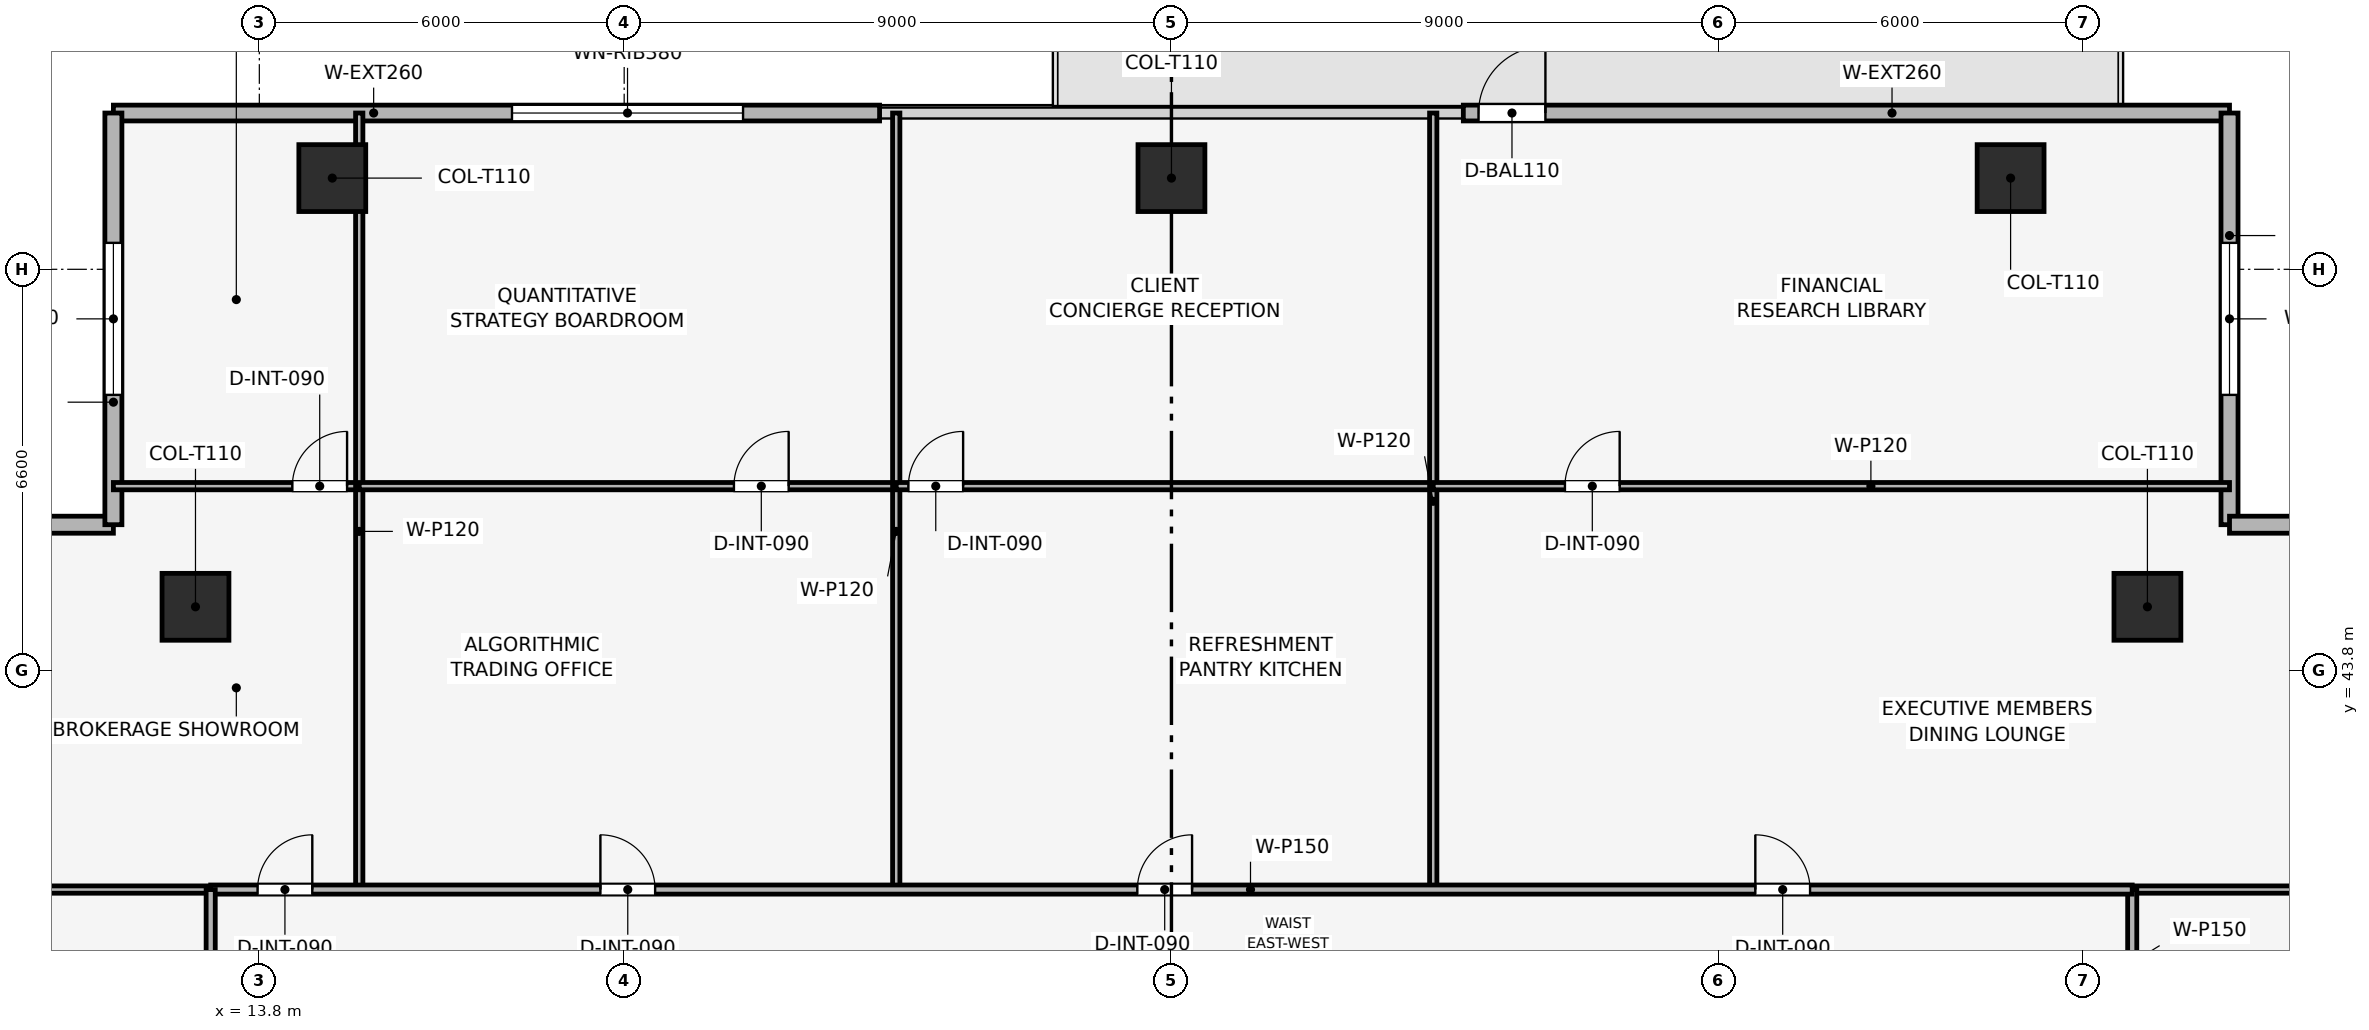
"""IFC4 building model, lengths in metres.
Left out: names, types, materials, properties, quantities, classifications, styles, units other than length and angle.
Written with IfcOpenShell. Run it as: python <this file> out.ifc"""

import sys

from ifc_helpers import new_model, si_unit, direction, frame, frame_2d, origin, origin_2d, place, context, subcontext, project, spatial, rectangle, extrude, element, fill, save


model = new_model("IFC4")
c1 = context("Model", 3, precision=1e-05, world=origin(), true_north=direction((0.0, 1.0)))
c2 = subcontext(c1, "Body", "Model", "MODEL_VIEW")
j1 = project(units=[si_unit("LENGTHUNIT", "METRE"), si_unit("PLANEANGLEUNIT", "RADIAN")], contexts=[c1])
p1 = place(None, origin())
s1 = spatial("IfcSite", under=j1, at=p1, CompositionType="ELEMENT")
p2 = place(p1, origin())
s2 = spatial("IfcBuilding", under=s1, at=p2, CompositionType="ELEMENT")
p3 = place(p2, frame((0.0, 0.0, 183.3)))
s3 = spatial("IfcBuildingStorey", under=s2, at=p3, CompositionType="ELEMENT", Elevation=183.3)
for number, where, z_axis, x_axis in (
    (1, (42.6, 51.9, 0.003), (0.0, 0.0, 1.0), (1.0, 0.0, 0.0)),
    (2, (28.8, 51.9, 0.003), (0.0, 0.0, 1.0), (1.0, 0.0, 0.0)),
    (3, (15.0, 51.9, 0.003), (0.0, 0.0, 1.0), (1.0, 0.0, 0.0)),
    (4, (44.85, 44.85, 0.003), (0.0, 0.0, 1.0), (1.0, 0.0, 0.0)),
    (5, (12.75, 44.85, 0.003), (0.0, 0.0, 1.0), (1.0, 0.0, 0.0)),
):
    element("IfcColumn", number, at=place(p3, frame(where, z_axis=z_axis, x_axis=x_axis)), inside=s3, PredefinedType="COLUMN", context=c2, shape_type="SweptSolid", body=[
        extrude(rectangle(XDim=1.1, YDim=1.1, at=origin_2d()), origin(), (0.0, 0.0, 1.0), 3.489),
    ])
p4 = place(p3, frame((11.4, 52.97, 0.0), z_axis=(0.0, 0.0, 1.0), x_axis=(1.0, 0.0, 0.0)))
e6 = element("IfcWall", 6, at=p4, inside=s3, PredefinedType="SOLIDWALL", context=c2, shape_type="SweptSolid", body=[
    extrude(rectangle(XDim=12.6, YDim=0.26, at=frame_2d((6.3, 0.0))), origin(), (0.0, 0.0, 1.0), 3.495),
])
p5 = place(p4, frame((6.555, 0.0, 0.9)))
e7 = element("IfcOpeningElement", 7, at=p5, cuts=e6, PredefinedType="OPENING", context=c2, shape_type="SweptSolid", body=[
    extrude(rectangle(XDim=3.8, YDim=1.9, at=frame_2d((1.9, 0.95))), frame((0.0, 0.14, 0.0), z_axis=(0.0, -1.0, 0.0), x_axis=(1.0, 0.0, 0.0)), (0.0, 0.0, 1.0), 0.28),
])
p6 = place(p3, frame((33.6, 52.97, 0.0), z_axis=(0.0, 0.0, 1.0), x_axis=(1.0, 0.0, 0.0)))
e8 = element("IfcWall", 8, at=p6, inside=s3, PredefinedType="SOLIDWALL", context=c2, shape_type="SweptSolid", body=[
    extrude(rectangle(XDim=12.6, YDim=0.26, at=frame_2d((6.3, 0.0))), origin(), (0.0, 0.0, 1.0), 3.495),
])
p7 = place(p6, frame((0.25, 0.0, 0.0)))
e9 = element("IfcOpeningElement", 9, at=p7, cuts=e8, PredefinedType="OPENING", context=c2, shape_type="SweptSolid", body=[
    extrude(rectangle(XDim=1.1, YDim=2.2, at=frame_2d((0.55, 1.1))), frame((0.0, 0.14, 0.0), z_axis=(0.0, -1.0, 0.0), x_axis=(1.0, 0.0, 0.0)), (0.0, 0.0, 1.0), 0.28),
])
p8 = place(p3, frame((4.63, 46.2, 0.0), z_axis=(0.0, 0.0, 1.0), x_axis=(1.0, 0.0, 0.0)))
e10 = element("IfcWall", 10, at=p8, inside=s3, PredefinedType="SOLIDWALL", context=c2, shape_type="SweptSolid", body=[
    extrude(rectangle(XDim=6.77, YDim=0.28, at=frame_2d((3.385, 0.0))), origin(), (0.0, 0.0, 1.0), 3.495),
])
p9 = place(p8, frame((2.135, 0.0, 0.9)))
e11 = element("IfcOpeningElement", 11, at=p9, cuts=e10, PredefinedType="OPENING", context=c2, shape_type="SweptSolid", body=[
    extrude(rectangle(XDim=2.5, YDim=1.9, at=frame_2d((1.25, 0.95))), frame((0.0, 0.15, 0.0), z_axis=(0.0, -1.0, 0.0), x_axis=(1.0, 0.0, 0.0)), (0.0, 0.0, 1.0), 0.3),
])
p10 = place(p3, frame((11.4, 46.2, 0.0), z_axis=(0.0, 0.0, 1.0), x_axis=(0.0, 1.0, 0.0)))
e12 = element("IfcWall", 12, at=p10, inside=s3, PredefinedType="SOLIDWALL", context=c2, shape_type="SweptSolid", body=[
    extrude(rectangle(XDim=6.77, YDim=0.28, at=frame_2d((3.385, 0.0))), origin(), (0.0, 0.0, 1.0), 3.495),
])
p11 = place(p10, frame((2.135, 0.0, 0.9)))
e13 = element("IfcOpeningElement", 13, at=p11, cuts=e12, PredefinedType="OPENING", context=c2, shape_type="SweptSolid", body=[
    extrude(rectangle(XDim=2.5, YDim=1.9, at=frame_2d((1.25, 0.95))), frame((0.0, 0.15, 0.0), z_axis=(0.0, -1.0, 0.0), x_axis=(1.0, 0.0, 0.0)), (0.0, 0.0, 1.0), 0.3),
])
p12 = place(p3, frame((46.2, 52.97, 0.0), z_axis=(0.0, 0.0, 1.0), x_axis=(0.0, -1.0, 0.0)))
e14 = element("IfcWall", 14, at=p12, inside=s3, PredefinedType="SOLIDWALL", context=c2, shape_type="SweptSolid", body=[
    extrude(rectangle(XDim=6.77, YDim=0.28, at=frame_2d((3.385, 0.0))), origin(), (0.0, 0.0, 1.0), 3.495),
])
p13 = place(p12, frame((2.135, 0.0, 0.9)))
e15 = element("IfcOpeningElement", 15, at=p13, cuts=e14, PredefinedType="OPENING", context=c2, shape_type="SweptSolid", body=[
    extrude(rectangle(XDim=2.5, YDim=1.9, at=frame_2d((1.25, 0.95))), frame((0.0, 0.15, 0.0), z_axis=(0.0, -1.0, 0.0), x_axis=(1.0, 0.0, 0.0)), (0.0, 0.0, 1.0), 0.3),
])
p14 = place(p3, frame((46.2, 46.2, 0.0), z_axis=(0.0, 0.0, 1.0), x_axis=(1.0, 0.0, 0.0)))
e16 = element("IfcWall", 16, at=p14, inside=s3, PredefinedType="SOLIDWALL", context=c2, shape_type="SweptSolid", body=[
    extrude(rectangle(XDim=6.77, YDim=0.28, at=frame_2d((3.385, 0.0))), origin(), (0.0, 0.0, 1.0), 3.495),
])
p15 = place(p14, frame((2.135, 0.0, 0.9)))
e17 = element("IfcOpeningElement", 17, at=p15, cuts=e16, PredefinedType="OPENING", context=c2, shape_type="SweptSolid", body=[
    extrude(rectangle(XDim=2.5, YDim=1.9, at=frame_2d((1.25, 0.95))), frame((0.0, 0.15, 0.0), z_axis=(0.0, -1.0, 0.0), x_axis=(1.0, 0.0, 0.0)), (0.0, 0.0, 1.0), 0.3),
])
p16 = place(p3, frame((11.4, 46.834, 0.0), z_axis=(0.0, 0.0, 1.0), x_axis=(1.0, 0.0, 0.0)))
e18 = element("IfcWall", 18, at=p16, inside=s3, PredefinedType="PARTITIONING", context=c2, shape_type="SweptSolid", body=[
    extrude(rectangle(XDim=4.043, YDim=0.12, at=frame_2d((2.021, 0.0))), origin(), (0.0, 0.0, 1.0), 2.98),
])
p17 = place(p16, frame((2.943, 0.0, 0.0)))
e19 = element("IfcOpeningElement", 19, at=p17, cuts=e18, PredefinedType="OPENING", context=c2, shape_type="SweptSolid", body=[
    extrude(rectangle(XDim=0.9, YDim=2.1, at=frame_2d((0.45, 1.05))), frame((0.0, 0.07, 0.0), z_axis=(0.0, -1.0, 0.0), x_axis=(1.0, 0.0, 0.0)), (0.0, 0.0, 1.0), 0.14),
])
p18 = place(p3, frame((15.443, 40.2, 0.0), z_axis=(0.0, 0.0, 1.0), x_axis=(0.0, 1.0, 0.0)))
e20 = element("IfcWall", 20, at=p18, inside=s3, PredefinedType="PARTITIONING", context=c2, shape_type="SweptSolid", body=[
    extrude(rectangle(XDim=12.77, YDim=0.12, at=frame_2d((6.385, 0.0))), origin(), (0.0, 0.0, 1.0), 2.98),
])
p19 = place(p3, frame((15.443, 46.834, 0.0), z_axis=(0.0, 0.0, 1.0), x_axis=(1.0, 0.0, 0.0)))
e21 = element("IfcWall", 21, at=p19, inside=s3, PredefinedType="PARTITIONING", context=c2, shape_type="SweptSolid", body=[
    extrude(rectangle(XDim=8.831, YDim=0.12, at=frame_2d((4.416, 0.0))), origin(), (0.0, 0.0, 1.0), 3.03),
])
p20 = place(p19, frame((6.162, 0.0, 0.0)))
e22 = element("IfcOpeningElement", 22, at=p20, cuts=e21, PredefinedType="OPENING", context=c2, shape_type="SweptSolid", body=[
    extrude(rectangle(XDim=0.9, YDim=2.1, at=frame_2d((0.45, 1.05))), frame((0.0, 0.07, 0.0), z_axis=(0.0, -1.0, 0.0), x_axis=(1.0, 0.0, 0.0)), (0.0, 0.0, 1.0), 0.14),
])
p21 = place(p3, frame((24.274, 40.2, 0.0), z_axis=(0.0, 0.0, 1.0), x_axis=(0.0, 1.0, 0.0)))
e23 = element("IfcWall", 23, at=p21, inside=s3, PredefinedType="PARTITIONING", context=c2, shape_type="SweptSolid", body=[
    extrude(rectangle(XDim=12.77, YDim=0.12, at=frame_2d((6.385, 0.0))), origin(), (0.0, 0.0, 1.0), 2.98),
])
p22 = place(p3, frame((24.274, 46.834, 0.0), z_axis=(0.0, 0.0, 1.0), x_axis=(1.0, 0.0, 0.0)))
e24 = element("IfcWall", 24, at=p22, inside=s3, PredefinedType="PARTITIONING", context=c2, shape_type="SweptSolid", body=[
    extrude(rectangle(XDim=8.831, YDim=0.12, at=frame_2d((4.416, 0.0))), origin(), (0.0, 0.0, 1.0), 3.03),
])
p23 = place(p22, frame((0.2, 0.0, 0.0)))
e25 = element("IfcOpeningElement", 25, at=p23, cuts=e24, PredefinedType="OPENING", context=c2, shape_type="SweptSolid", body=[
    extrude(rectangle(XDim=0.9, YDim=2.1, at=frame_2d((0.45, 1.05))), frame((0.0, 0.07, 0.0), z_axis=(0.0, -1.0, 0.0), x_axis=(1.0, 0.0, 0.0)), (0.0, 0.0, 1.0), 0.14),
])
p24 = place(p3, frame((33.105, 40.2, 0.0), z_axis=(0.0, 0.0, 1.0), x_axis=(0.0, 1.0, 0.0)))
e26 = element("IfcWall", 26, at=p24, inside=s3, PredefinedType="PARTITIONING", context=c2, shape_type="SweptSolid", body=[
    extrude(rectangle(XDim=12.77, YDim=0.12, at=frame_2d((6.385, 0.0))), origin(), (0.0, 0.0, 1.0), 2.98),
])
p25 = place(p3, frame((33.105, 46.834, 0.0), z_axis=(0.0, 0.0, 1.0), x_axis=(1.0, 0.0, 0.0)))
e27 = element("IfcWall", 27, at=p25, inside=s3, PredefinedType="PARTITIONING", context=c2, shape_type="SweptSolid", body=[
    extrude(rectangle(XDim=13.095, YDim=0.12, at=frame_2d((6.547, 0.0))), origin(), (0.0, 0.0, 1.0), 2.98),
])
p26 = place(p25, frame((2.166, 0.0, 0.0)))
e28 = element("IfcOpeningElement", 28, at=p26, cuts=e27, PredefinedType="OPENING", context=c2, shape_type="SweptSolid", body=[
    extrude(rectangle(XDim=0.9, YDim=2.1, at=frame_2d((0.45, 1.05))), frame((0.0, 0.07, 0.0), z_axis=(0.0, -1.0, 0.0), x_axis=(1.0, 0.0, 0.0)), (0.0, 0.0, 1.0), 0.14),
])
p27 = place(p3, frame((4.63, 40.2, 0.0), z_axis=(0.0, 0.0, 1.0), x_axis=(1.0, 0.0, 0.0)))
e29 = element("IfcWall", 29, at=p27, inside=s3, PredefinedType="PARTITIONING", context=c2, shape_type="SweptSolid", body=[
    extrude(rectangle(XDim=8.37, YDim=0.12, at=frame_2d((4.185, 0.0))), origin(), (0.0, 0.0, 1.0), 2.98),
])
p28 = place(p3, frame((44.6, 40.2, 0.0), z_axis=(0.0, 0.0, 1.0), x_axis=(1.0, 0.0, 0.0)))
e30 = element("IfcWall", 30, at=p28, inside=s3, PredefinedType="PARTITIONING", context=c2, shape_type="SweptSolid", body=[
    extrude(rectangle(XDim=8.37, YDim=0.12, at=frame_2d((4.185, 0.0))), origin(), (0.0, 0.0, 1.0), 2.98),
])
p29 = place(p3, frame((44.6, 37.8, 0.0), z_axis=(0.0, 0.0, 1.0), x_axis=(0.0, 1.0, 0.0)))
e31 = element("IfcWall", 31, at=p29, inside=s3, PredefinedType="PARTITIONING", context=c2, shape_type="SweptSolid", body=[
    extrude(rectangle(XDim=2.4, YDim=0.15, at=frame_2d((1.2, 0.0))), origin(), (0.0, 0.0, 1.0), 3.495),
])
p30 = place(p3, frame((13.0, 40.2, 0.0), z_axis=(0.0, 0.0, 1.0), x_axis=(1.0, 0.0, 0.0)))
e32 = element("IfcWall", 32, at=p30, inside=s3, PredefinedType="PARTITIONING", context=c2, shape_type="SweptSolid", body=[
    extrude(rectangle(XDim=31.6, YDim=0.15, at=frame_2d((15.8, 0.0))), origin(), (0.0, 0.0, 1.0), 3.03),
])
p31 = place(p30, frame((0.771, 0.0, 0.0)))
e33 = element("IfcOpeningElement", 33, at=p31, cuts=e32, PredefinedType="OPENING", context=c2, shape_type="SweptSolid", body=[
    extrude(rectangle(XDim=0.9, YDim=2.1, at=frame_2d((0.45, 1.05))), frame((0.0, 0.085, 0.0), z_axis=(0.0, -1.0, 0.0), x_axis=(1.0, 0.0, 0.0)), (0.0, 0.0, 1.0), 0.17),
])
p32 = place(p30, frame((6.409, 0.0, 0.0)))
e34 = element("IfcOpeningElement", 34, at=p32, cuts=e32, PredefinedType="OPENING", context=c2, shape_type="SweptSolid", body=[
    extrude(rectangle(XDim=0.9, YDim=2.1, at=frame_2d((0.45, 1.05))), frame((0.0, 0.085, 0.0), z_axis=(0.0, -1.0, 0.0), x_axis=(1.0, 0.0, 0.0)), (0.0, 0.0, 1.0), 0.17),
])
p33 = place(p30, frame((15.239, 0.0, 0.0)))
e35 = element("IfcOpeningElement", 35, at=p33, cuts=e32, PredefinedType="OPENING", context=c2, shape_type="SweptSolid", body=[
    extrude(rectangle(XDim=0.9, YDim=2.1, at=frame_2d((0.45, 1.05))), frame((0.0, 0.085, 0.0), z_axis=(0.0, -1.0, 0.0), x_axis=(1.0, 0.0, 0.0)), (0.0, 0.0, 1.0), 0.17),
])
p34 = place(p30, frame((25.402, 0.0, 0.0)))
e36 = element("IfcOpeningElement", 36, at=p34, cuts=e32, PredefinedType="OPENING", context=c2, shape_type="SweptSolid", body=[
    extrude(rectangle(XDim=0.9, YDim=2.1, at=frame_2d((0.45, 1.05))), frame((0.0, 0.085, 0.0), z_axis=(0.0, -1.0, 0.0), x_axis=(1.0, 0.0, 0.0)), (0.0, 0.0, 1.0), 0.17),
])
p35 = place(p3, frame((13.0, 17.4, 0.0), z_axis=(0.0, 0.0, 1.0), x_axis=(0.0, 1.0, 0.0)))
e37 = element("IfcWall", 37, at=p35, inside=s3, PredefinedType="PARTITIONING", context=c2, shape_type="SweptSolid", body=[
    extrude(rectangle(XDim=22.8, YDim=0.15, at=frame_2d((11.4, 0.0))), origin(), (0.0, 0.0, 1.0), 3.03),
])
p36 = place(p35, frame((6.115, 0.0, 0.0)))
e38 = element("IfcOpeningElement", 38, at=p36, cuts=e37, PredefinedType="OPENING", context=c2, shape_type="SweptSolid", body=[
    extrude(rectangle(XDim=0.9, YDim=2.1, at=frame_2d((0.45, 1.05))), frame((0.0, 0.085, 0.0), z_axis=(0.0, -1.0, 0.0), x_axis=(1.0, 0.0, 0.0)), (0.0, 0.0, 1.0), 0.17),
])
p37 = place(p35, frame((15.115, 0.0, 0.0)))
e39 = element("IfcOpeningElement", 39, at=p37, cuts=e37, PredefinedType="OPENING", context=c2, shape_type="SweptSolid", body=[
    extrude(rectangle(XDim=0.9, YDim=2.1, at=frame_2d((0.45, 1.05))), frame((0.0, 0.085, 0.0), z_axis=(0.0, -1.0, 0.0), x_axis=(1.0, 0.0, 0.0)), (0.0, 0.0, 1.0), 0.17),
])
p38 = place(p7, origin())
e40 = element("IfcDoor", 40, at=p38, inside=s3, OperationType="SINGLE_SWING_RIGHT", PredefinedType="DOOR", context=c2, shape_type="SweptSolid", body=[
    extrude(rectangle(XDim=1.1, YDim=2.2, at=frame_2d((0.55, 1.1))), frame((0.0, 0.025, 0.0), z_axis=(0.0, -1.0, 0.0), x_axis=(1.0, 0.0, 0.0)), (0.0, 0.0, 1.0), 0.05),
])
fill(e9, e40)
p39 = place(p5, origin())
e41 = element("IfcWindow", 41, at=p39, inside=s3, PartitioningType="SINGLE_PANEL", PredefinedType="WINDOW", context=c2, shape_type="SweptSolid", body=[
    extrude(rectangle(XDim=3.8, YDim=1.9, at=frame_2d((1.9, 0.95))), frame((0.0, 0.03, 0.0), z_axis=(0.0, -1.0, 0.0), x_axis=(1.0, 0.0, 0.0)), (0.0, 0.0, 1.0), 0.06),
])
fill(e7, e41)
p40 = place(p11, origin())
e42 = element("IfcWindow", 42, at=p40, inside=s3, PartitioningType="SINGLE_PANEL", PredefinedType="WINDOW", context=c2, shape_type="SweptSolid", body=[
    extrude(rectangle(XDim=2.5, YDim=1.9, at=frame_2d((1.25, 0.95))), frame((0.0, 0.03, 0.0), z_axis=(0.0, -1.0, 0.0), x_axis=(1.0, 0.0, 0.0)), (0.0, 0.0, 1.0), 0.06),
])
fill(e13, e42)
p41 = place(p13, origin())
e43 = element("IfcWindow", 43, at=p41, inside=s3, PartitioningType="SINGLE_PANEL", PredefinedType="WINDOW", context=c2, shape_type="SweptSolid", body=[
    extrude(rectangle(XDim=2.5, YDim=1.9, at=frame_2d((1.25, 0.95))), frame((0.0, 0.03, 0.0), z_axis=(0.0, -1.0, 0.0), x_axis=(1.0, 0.0, 0.0)), (0.0, 0.0, 1.0), 0.06),
])
fill(e15, e43)
p42 = place(p17, origin())
e44 = element("IfcDoor", 44, at=p42, inside=s3, OperationType="SINGLE_SWING_RIGHT", PredefinedType="DOOR", context=c2, shape_type="SweptSolid", body=[
    extrude(rectangle(XDim=0.9, YDim=2.1, at=frame_2d((0.45, 1.05))), frame((0.0, 0.025, 0.0), z_axis=(0.0, -1.0, 0.0), x_axis=(1.0, 0.0, 0.0)), (0.0, 0.0, 1.0), 0.05),
])
fill(e19, e44)
p43 = place(p20, origin())
e45 = element("IfcDoor", 45, at=p43, inside=s3, OperationType="SINGLE_SWING_RIGHT", PredefinedType="DOOR", context=c2, shape_type="SweptSolid", body=[
    extrude(rectangle(XDim=0.9, YDim=2.1, at=frame_2d((0.45, 1.05))), frame((0.0, 0.025, 0.0), z_axis=(0.0, -1.0, 0.0), x_axis=(1.0, 0.0, 0.0)), (0.0, 0.0, 1.0), 0.05),
])
fill(e22, e45)
p44 = place(p23, origin())
e46 = element("IfcDoor", 46, at=p44, inside=s3, OperationType="SINGLE_SWING_RIGHT", PredefinedType="DOOR", context=c2, shape_type="SweptSolid", body=[
    extrude(rectangle(XDim=0.9, YDim=2.1, at=frame_2d((0.45, 1.05))), frame((0.0, 0.025, 0.0), z_axis=(0.0, -1.0, 0.0), x_axis=(1.0, 0.0, 0.0)), (0.0, 0.0, 1.0), 0.05),
])
fill(e25, e46)
p45 = place(p26, origin())
e47 = element("IfcDoor", 47, at=p45, inside=s3, OperationType="SINGLE_SWING_RIGHT", PredefinedType="DOOR", context=c2, shape_type="SweptSolid", body=[
    extrude(rectangle(XDim=0.9, YDim=2.1, at=frame_2d((0.45, 1.05))), frame((0.0, 0.025, 0.0), z_axis=(0.0, -1.0, 0.0), x_axis=(1.0, 0.0, 0.0)), (0.0, 0.0, 1.0), 0.05),
])
fill(e28, e47)
p46 = place(p31, origin())
e48 = element("IfcDoor", 48, at=p46, inside=s3, OperationType="SINGLE_SWING_RIGHT", PredefinedType="DOOR", context=c2, shape_type="SweptSolid", body=[
    extrude(rectangle(XDim=0.9, YDim=2.1, at=frame_2d((0.45, 1.05))), frame((0.0, 0.025, 0.0), z_axis=(0.0, -1.0, 0.0), x_axis=(1.0, 0.0, 0.0)), (0.0, 0.0, 1.0), 0.05),
])
fill(e33, e48)
p47 = place(p32, origin())
e49 = element("IfcDoor", 49, at=p47, inside=s3, OperationType="SINGLE_SWING_LEFT", PredefinedType="DOOR", context=c2, shape_type="SweptSolid", body=[
    extrude(rectangle(XDim=0.9, YDim=2.1, at=frame_2d((0.45, 1.05))), frame((0.0, 0.025, 0.0), z_axis=(0.0, -1.0, 0.0), x_axis=(1.0, 0.0, 0.0)), (0.0, 0.0, 1.0), 0.05),
])
fill(e34, e49)
p48 = place(p33, origin())
e50 = element("IfcDoor", 50, at=p48, inside=s3, OperationType="SINGLE_SWING_RIGHT", PredefinedType="DOOR", context=c2, shape_type="SweptSolid", body=[
    extrude(rectangle(XDim=0.9, YDim=2.1, at=frame_2d((0.45, 1.05))), frame((0.0, 0.025, 0.0), z_axis=(0.0, -1.0, 0.0), x_axis=(1.0, 0.0, 0.0)), (0.0, 0.0, 1.0), 0.05),
])
fill(e35, e50)
p49 = place(p34, origin())
e51 = element("IfcDoor", 51, at=p49, inside=s3, OperationType="SINGLE_SWING_LEFT", PredefinedType="DOOR", context=c2, shape_type="SweptSolid", body=[
    extrude(rectangle(XDim=0.9, YDim=2.1, at=frame_2d((0.45, 1.05))), frame((0.0, 0.025, 0.0), z_axis=(0.0, -1.0, 0.0), x_axis=(1.0, 0.0, 0.0)), (0.0, 0.0, 1.0), 0.05),
])
fill(e36, e51)
save(model, sys.argv[1])
